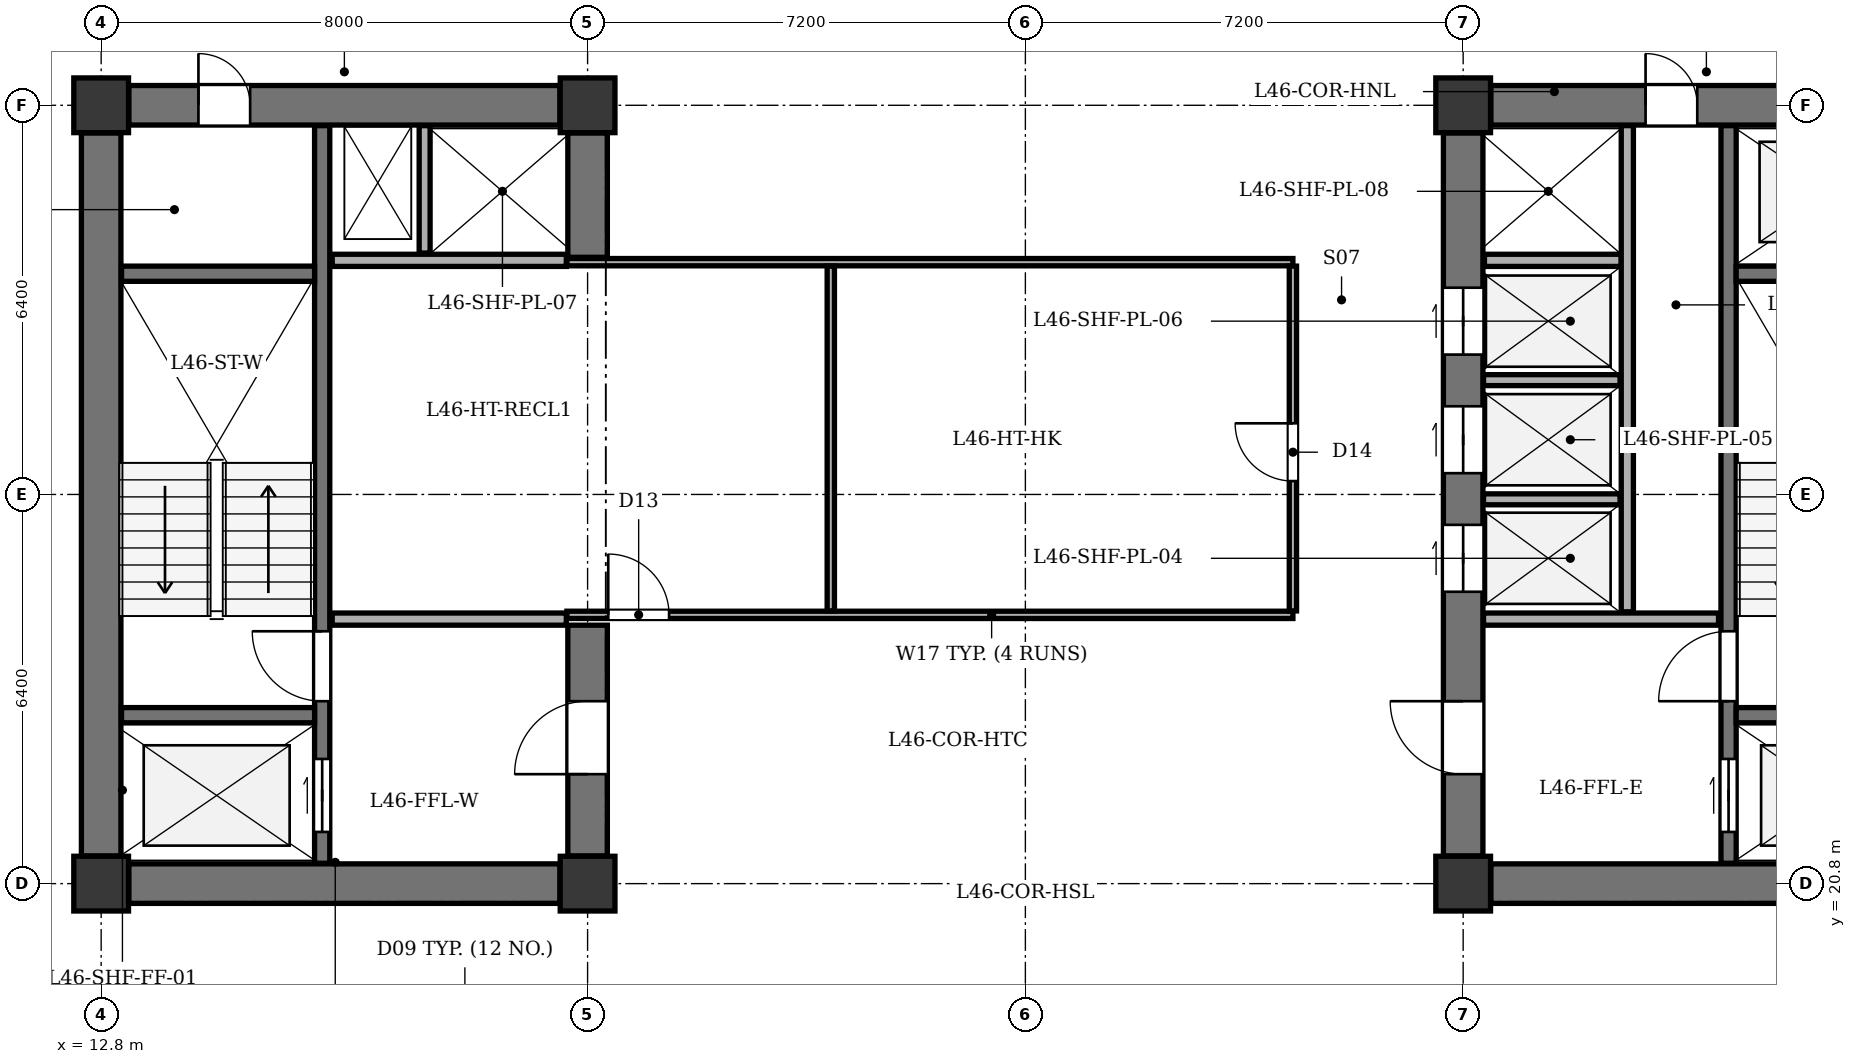
"""IFC4 building model, lengths in metres.
Left out: names, types, materials, properties, quantities, classifications, styles, units other than length and angle.
Written with IfcOpenShell. Run it as: python <this file> out.ifc"""

import sys

from ifc_helpers import new_model, si_unit, direction, frame, frame_2d, origin, origin_2d, place, context, subcontext, project, spatial, rectangle, extrude, element, fill, save


model = new_model("IFC4")
c1 = context("Model", 3, precision=1e-05, world=origin(), true_north=direction((0.0, 1.0)))
c2 = subcontext(c1, "Body", "Model", "MODEL_VIEW")
j1 = project(units=[si_unit("LENGTHUNIT", "METRE"), si_unit("PLANEANGLEUNIT", "RADIAN")], contexts=[c1])
p1 = place(None, origin())
s1 = spatial("IfcSite", under=j1, at=p1, CompositionType="ELEMENT")
p2 = place(p1, origin())
s2 = spatial("IfcBuilding", under=s1, at=p2, CompositionType="ELEMENT")
p3 = place(p2, frame((0.0, 0.0, 179.8)))
s3 = spatial("IfcBuildingStorey", under=s2, at=p3, CompositionType="ELEMENT", Elevation=179.8)
for number, where, z_axis, x_axis in (
    (1, (12.8, 20.8, 0.0), (0.0, 0.0, 1.0), (1.0, 0.0, 0.0)),
    (2, (20.8, 20.8, 0.0), (0.0, 0.0, 1.0), (1.0, 0.0, 0.0)),
    (3, (12.8, 33.6, 0.0), (0.0, 0.0, 1.0), (1.0, 0.0, 0.0)),
    (4, (20.8, 33.6, 0.0), (0.0, 0.0, 1.0), (1.0, 0.0, 0.0)),
    (5, (35.2, 20.8, 0.0), (0.0, 0.0, 1.0), (1.0, 0.0, 0.0)),
    (6, (35.2, 33.6, 0.0), (0.0, 0.0, 1.0), (1.0, 0.0, 0.0)),
):
    element("IfcColumn", number, at=place(p3, frame(where, z_axis=z_axis, x_axis=x_axis)), inside=s3, PredefinedType="COLUMN", context=c2, shape_type="SweptSolid", body=[
        extrude(rectangle(XDim=0.9, YDim=0.9, at=origin_2d()), origin(), (0.0, 0.0, 1.0), 3.5),
    ])
p4 = place(p3, frame((12.8, 21.255, 0.0), z_axis=(0.0, 0.0, 1.0), x_axis=(0.0, 1.0, 0.0)))
e7 = element("IfcWall", 7, at=p4, inside=s3, PredefinedType="SHEAR", context=c2, shape_type="SweptSolid", body=[
    extrude(rectangle(XDim=11.89, YDim=0.65, at=frame_2d((5.945, 0.0))), origin(), (0.0, 0.0, 1.0), 3.05),
])
p5 = place(p3, frame((13.255, 20.8, 0.0), z_axis=(0.0, 0.0, 1.0), x_axis=(1.0, 0.0, 0.0)))
e8 = element("IfcWall", 8, at=p5, inside=s3, PredefinedType="SHEAR", context=c2, shape_type="SweptSolid", body=[
    extrude(rectangle(XDim=7.09, YDim=0.65, at=frame_2d((3.545, 0.0))), origin(), (0.0, 0.0, 1.0), 3.05),
])
p6 = place(p3, frame((13.255, 33.6, 0.0), z_axis=(0.0, 0.0, 1.0), x_axis=(1.0, 0.0, 0.0)))
e9 = element("IfcWall", 9, at=p6, inside=s3, PredefinedType="SHEAR", context=c2, shape_type="SweptSolid", body=[
    extrude(rectangle(XDim=7.09, YDim=0.65, at=frame_2d((3.545, 0.0))), origin(), (0.0, 0.0, 1.0), 3.05),
])
p7 = place(p6, frame((1.145, 0.0, 0.0)))
e10 = element("IfcOpeningElement", 10, at=p7, cuts=e9, PredefinedType="OPENING", context=c2, shape_type="SweptSolid", body=[
    extrude(rectangle(XDim=0.85, YDim=2.02, at=frame_2d((0.425, 1.01))), frame((0.0, 0.335, 0.0), z_axis=(0.0, -1.0, 0.0), x_axis=(1.0, 0.0, 0.0)), (0.0, 0.0, 1.0), 0.67),
])
p8 = place(p3, frame((20.8, 21.255, 0.0), z_axis=(0.0, 0.0, 1.0), x_axis=(0.0, 1.0, 0.0)))
e11 = element("IfcWall", 11, at=p8, inside=s3, PredefinedType="SHEAR", context=c2, shape_type="SweptSolid", body=[
    extrude(rectangle(XDim=3.795, YDim=0.65, at=frame_2d((1.897, 0.0))), origin(), (0.0, 0.0, 1.0), 3.05),
])
p9 = place(p8, frame((1.345, 0.0, 0.0)))
e12 = element("IfcOpeningElement", 12, at=p9, cuts=e11, PredefinedType="OPENING", context=c2, shape_type="SweptSolid", body=[
    extrude(rectangle(XDim=1.2, YDim=2.15, at=frame_2d((0.6, 1.075))), frame((0.0, 0.335, 0.0), z_axis=(0.0, -1.0, 0.0), x_axis=(1.0, 0.0, 0.0)), (0.0, 0.0, 1.0), 0.67),
])
p10 = place(p3, frame((20.8, 31.1, 0.0), z_axis=(0.0, 0.0, 1.0), x_axis=(0.0, 1.0, 0.0)))
e13 = element("IfcWall", 13, at=p10, inside=s3, PredefinedType="SHEAR", context=c2, shape_type="SweptSolid", body=[
    extrude(rectangle(XDim=2.045, YDim=0.65, at=frame_2d((1.022, 0.0))), origin(), (0.0, 0.0, 1.0), 3.05),
])
p11 = place(p3, frame((16.435, 21.135, 0.0), z_axis=(0.0, 0.0, 1.0), x_axis=(0.0, 1.0, 0.0)))
e14 = element("IfcWall", 14, at=p11, inside=s3, PredefinedType="SHEAR", context=c2, shape_type="SweptSolid", body=[
    extrude(rectangle(XDim=12.13, YDim=0.25, at=frame_2d((6.065, 0.0))), origin(), (0.0, 0.0, 1.0), 3.05),
])
p12 = place(p11, frame((0.515, 0.0, 0.0)))
e15 = element("IfcOpeningElement", 15, at=p12, cuts=e14, PredefinedType="OPENING", context=c2, shape_type="SweptSolid", body=[
    extrude(rectangle(XDim=1.2, YDim=2.15, at=frame_2d((0.6, 1.075))), frame((0.0, 0.135, 0.0), z_axis=(0.0, -1.0, 0.0), x_axis=(1.0, 0.0, 0.0)), (0.0, 0.0, 1.0), 0.27),
])
p13 = place(p11, frame((2.665, 0.0, 0.0)))
e16 = element("IfcOpeningElement", 16, at=p13, cuts=e14, PredefinedType="OPENING", context=c2, shape_type="SweptSolid", body=[
    extrude(rectangle(XDim=1.15, YDim=2.15, at=frame_2d((0.575, 1.075))), frame((0.0, 0.135, 0.0), z_axis=(0.0, -1.0, 0.0), x_axis=(1.0, 0.0, 0.0)), (0.0, 0.0, 1.0), 0.27),
])
for number, where, z_axis, x_axis in (
    (17, (13.135, 23.57, 0.0), (0.0, 0.0, 1.0), (1.0, 0.0, 0.0)),
    (18, (13.135, 30.83, 0.0), (0.0, 0.0, 1.0), (1.0, 0.0, 0.0)),
):
    element("IfcWall", number, at=place(p3, frame(where, z_axis=z_axis, x_axis=x_axis)), inside=s3, PredefinedType="SHEAR", context=c2, shape_type="SweptSolid", body=[
        extrude(rectangle(XDim=3.175, YDim=0.25, at=frame_2d((1.587, 0.0))), origin(), (0.0, 0.0, 1.0), 3.05),
    ])
for number, where, z_axis, x_axis in (
    (19, (16.6, 25.15, 0.0), (0.0, 0.0, 1.0), (1.0, 0.0, 0.0)),
    (20, (16.6, 31.05, 0.0), (0.0, 0.0, 1.0), (1.0, 0.0, 0.0)),
):
    element("IfcWall", number, at=place(p3, frame(where, z_axis=z_axis, x_axis=x_axis)), inside=s3, PredefinedType="SOLIDWALL", context=c2, shape_type="SweptSolid", body=[
        extrude(rectangle(XDim=3.85, YDim=0.2, at=frame_2d((1.925, 0.0))), origin(), (0.0, 0.0, 1.0), 3.05),
    ])
p14 = place(p3, frame((18.12, 31.17, 0.0), z_axis=(0.0, 0.0, 1.0), x_axis=(0.0, 1.0, 0.0)))
e21 = element("IfcWall", 21, at=p14, inside=s3, PredefinedType="PARTITIONING", context=c2, shape_type="SweptSolid", body=[
    extrude(rectangle(XDim=2.095, YDim=0.18, at=frame_2d((1.047, 0.0))), origin(), (0.0, 0.0, 1.0), 3.05),
])
p15 = place(p3, frame((35.655, 20.8, 0.0), z_axis=(0.0, 0.0, 1.0), x_axis=(1.0, 0.0, 0.0)))
e22 = element("IfcWall", 22, at=p15, inside=s3, PredefinedType="SHEAR", context=c2, shape_type="SweptSolid", body=[
    extrude(rectangle(XDim=7.09, YDim=0.65, at=frame_2d((3.545, 0.0))), origin(), (0.0, 0.0, 1.0), 3.05),
])
p16 = place(p3, frame((35.655, 33.6, 0.0), z_axis=(0.0, 0.0, 1.0), x_axis=(1.0, 0.0, 0.0)))
e23 = element("IfcWall", 23, at=p16, inside=s3, PredefinedType="SHEAR", context=c2, shape_type="SweptSolid", body=[
    extrude(rectangle(XDim=7.09, YDim=0.65, at=frame_2d((3.545, 0.0))), origin(), (0.0, 0.0, 1.0), 3.05),
])
p17 = place(p16, frame((4.745, 0.0, 0.0)))
e24 = element("IfcOpeningElement", 24, at=p17, cuts=e23, PredefinedType="OPENING", context=c2, shape_type="SweptSolid", body=[
    extrude(rectangle(XDim=1.3, YDim=2.15, at=frame_2d((0.65, 1.075))), frame((0.0, 0.335, 0.0), z_axis=(0.0, -1.0, 0.0), x_axis=(1.0, 0.0, 0.0)), (0.0, 0.0, 1.0), 0.67),
])
p18 = place(p16, frame((2.545, 0.0, 0.0)))
e25 = element("IfcOpeningElement", 25, at=p18, cuts=e23, PredefinedType="OPENING", context=c2, shape_type="SweptSolid", body=[
    extrude(rectangle(XDim=0.85, YDim=2.02, at=frame_2d((0.425, 1.01))), frame((0.0, 0.335, 0.0), z_axis=(0.0, -1.0, 0.0), x_axis=(1.0, 0.0, 0.0)), (0.0, 0.0, 1.0), 0.67),
])
p19 = place(p3, frame((35.2, 21.255, 0.0), z_axis=(0.0, 0.0, 1.0), x_axis=(0.0, 1.0, 0.0)))
e26 = element("IfcWall", 26, at=p19, inside=s3, PredefinedType="SHEAR", context=c2, shape_type="SweptSolid", body=[
    extrude(rectangle(XDim=11.89, YDim=0.65, at=frame_2d((5.945, 0.0))), origin(), (0.0, 0.0, 1.0), 3.05),
])
p20 = place(p19, frame((1.345, 0.0, 0.0)))
e27 = element("IfcOpeningElement", 27, at=p20, cuts=e26, PredefinedType="OPENING", context=c2, shape_type="SweptSolid", body=[
    extrude(rectangle(XDim=1.2, YDim=2.15, at=frame_2d((0.6, 1.075))), frame((0.0, 0.335, 0.0), z_axis=(0.0, -1.0, 0.0), x_axis=(1.0, 0.0, 0.0)), (0.0, 0.0, 1.0), 0.67),
])
p21 = place(p19, frame((4.345, 0.0, 0.0)))
e28 = element("IfcOpeningElement", 28, at=p21, cuts=e26, PredefinedType="OPENING", context=c2, shape_type="SweptSolid", body=[
    extrude(rectangle(XDim=1.1, YDim=2.1, at=frame_2d((0.55, 1.05))), frame((0.0, 0.335, 0.0), z_axis=(0.0, -1.0, 0.0), x_axis=(1.0, 0.0, 0.0)), (0.0, 0.0, 1.0), 0.67),
])
p22 = place(p19, frame((6.295, 0.0, 0.0)))
e29 = element("IfcOpeningElement", 29, at=p22, cuts=e26, PredefinedType="OPENING", context=c2, shape_type="SweptSolid", body=[
    extrude(rectangle(XDim=1.1, YDim=2.1, at=frame_2d((0.55, 1.05))), frame((0.0, 0.335, 0.0), z_axis=(0.0, -1.0, 0.0), x_axis=(1.0, 0.0, 0.0)), (0.0, 0.0, 1.0), 0.67),
])
p23 = place(p19, frame((8.245, 0.0, 0.0)))
e30 = element("IfcOpeningElement", 30, at=p23, cuts=e26, PredefinedType="OPENING", context=c2, shape_type="SweptSolid", body=[
    extrude(rectangle(XDim=1.1, YDim=2.1, at=frame_2d((0.55, 1.05))), frame((0.0, 0.335, 0.0), z_axis=(0.0, -1.0, 0.0), x_axis=(1.0, 0.0, 0.0)), (0.0, 0.0, 1.0), 0.67),
])
p24 = place(p3, frame((39.565, 21.135, 0.0), z_axis=(0.0, 0.0, 1.0), x_axis=(0.0, 1.0, 0.0)))
e31 = element("IfcWall", 31, at=p24, inside=s3, PredefinedType="SHEAR", context=c2, shape_type="SweptSolid", body=[
    extrude(rectangle(XDim=12.13, YDim=0.25, at=frame_2d((6.065, 0.0))), origin(), (0.0, 0.0, 1.0), 3.05),
])
p25 = place(p24, frame((0.515, 0.0, 0.0)))
e32 = element("IfcOpeningElement", 32, at=p25, cuts=e31, PredefinedType="OPENING", context=c2, shape_type="SweptSolid", body=[
    extrude(rectangle(XDim=1.2, YDim=2.15, at=frame_2d((0.6, 1.075))), frame((0.0, 0.135, 0.0), z_axis=(0.0, -1.0, 0.0), x_axis=(1.0, 0.0, 0.0)), (0.0, 0.0, 1.0), 0.27),
])
p26 = place(p24, frame((2.665, 0.0, 0.0)))
e33 = element("IfcOpeningElement", 33, at=p26, cuts=e31, PredefinedType="OPENING", context=c2, shape_type="SweptSolid", body=[
    extrude(rectangle(XDim=1.15, YDim=2.15, at=frame_2d((0.575, 1.075))), frame((0.0, 0.135, 0.0), z_axis=(0.0, -1.0, 0.0), x_axis=(1.0, 0.0, 0.0)), (0.0, 0.0, 1.0), 0.27),
])
for number, where, z_axis, x_axis in (
    (34, (39.69, 23.57, 0.0), (0.0, 0.0, 1.0), (1.0, 0.0, 0.0)),
    (35, (39.69, 30.83, 0.0), (0.0, 0.0, 1.0), (1.0, 0.0, 0.0)),
):
    element("IfcWall", number, at=place(p3, frame(where, z_axis=z_axis, x_axis=x_axis)), inside=s3, PredefinedType="SHEAR", context=c2, shape_type="SweptSolid", body=[
        extrude(rectangle(XDim=3.175, YDim=0.25, at=frame_2d((1.587, 0.0))), origin(), (0.0, 0.0, 1.0), 3.05),
    ])
p27 = place(p3, frame((35.535, 25.15, 0.0), z_axis=(0.0, 0.0, 1.0), x_axis=(1.0, 0.0, 0.0)))
e36 = element("IfcWall", 36, at=p27, inside=s3, PredefinedType="SOLIDWALL", context=c2, shape_type="SweptSolid", body=[
    extrude(rectangle(XDim=3.865, YDim=0.2, at=frame_2d((1.933, 0.0))), origin(), (0.0, 0.0, 1.0), 3.05),
])
p28 = place(p3, frame((35.55, 31.05, 0.0), z_axis=(0.0, 0.0, 1.0), x_axis=(1.0, 0.0, 0.0)))
e37 = element("IfcWall", 37, at=p28, inside=s3, PredefinedType="SOLIDWALL", context=c2, shape_type="SweptSolid", body=[
    extrude(rectangle(XDim=2.25, YDim=0.2, at=frame_2d((1.125, 0.0))), origin(), (0.0, 0.0, 1.0), 3.05),
])
p29 = place(p3, frame((37.9, 25.27, 0.0), z_axis=(0.0, 0.0, 1.0), x_axis=(0.0, 1.0, 0.0)))
e38 = element("IfcWall", 38, at=p29, inside=s3, PredefinedType="SOLIDWALL", context=c2, shape_type="SweptSolid", body=[
    extrude(rectangle(XDim=7.995, YDim=0.2, at=frame_2d((3.998, 0.0))), origin(), (0.0, 0.0, 1.0), 3.05),
])
for number, where, z_axis, x_axis in (
    (39, (35.535, 27.12, 0.0), (0.0, 0.0, 1.0), (1.0, 0.0, 0.0)),
    (40, (35.535, 29.08, 0.0), (0.0, 0.0, 1.0), (1.0, 0.0, 0.0)),
):
    element("IfcWall", number, at=place(p3, frame(where, z_axis=z_axis, x_axis=x_axis)), inside=s3, PredefinedType="PARTITIONING", context=c2, shape_type="SweptSolid", body=[
        extrude(rectangle(XDim=2.245, YDim=0.18, at=frame_2d((1.123, 0.0))), origin(), (0.0, 0.0, 1.0), 3.05),
    ])
p30 = place(p3, frame((20.46, 25.22, 0.0), z_axis=(0.0, 0.0, 1.0), x_axis=(1.0, 0.0, 0.0)))
e41 = element("IfcWall", 41, at=p30, inside=s3, PredefinedType="PARTITIONING", context=c2, shape_type="SweptSolid", body=[
    extrude(rectangle(XDim=11.94, YDim=0.12, at=frame_2d((5.97, 0.0))), origin(), (0.0, 0.0, 1.0), 3.05),
])
p31 = place(p30, frame((0.68, 0.0, 0.0)))
e42 = element("IfcOpeningElement", 42, at=p31, cuts=e41, PredefinedType="OPENING", context=c2, shape_type="SweptSolid", body=[
    extrude(rectangle(XDim=1.0, YDim=2.1, at=frame_2d((0.5, 1.05))), frame((0.0, 0.07, 0.0), z_axis=(0.0, -1.0, 0.0), x_axis=(1.0, 0.0, 0.0)), (0.0, 0.0, 1.0), 0.14),
])
p32 = place(p3, frame((20.46, 31.02, 0.0), z_axis=(0.0, 0.0, 1.0), x_axis=(1.0, 0.0, 0.0)))
e43 = element("IfcWall", 43, at=p32, inside=s3, PredefinedType="PARTITIONING", context=c2, shape_type="SweptSolid", body=[
    extrude(rectangle(XDim=11.94, YDim=0.12, at=frame_2d((5.97, 0.0))), origin(), (0.0, 0.0, 1.0), 3.05),
])
p33 = place(p3, frame((32.4, 25.285, 0.0), z_axis=(0.0, 0.0, 1.0), x_axis=(0.0, 1.0, 0.0)))
e44 = element("IfcWall", 44, at=p33, inside=s3, PredefinedType="PARTITIONING", context=c2, shape_type="SweptSolid", body=[
    extrude(rectangle(XDim=5.67, YDim=0.12, at=frame_2d((2.835, 0.0))), origin(), (0.0, 0.0, 1.0), 3.05),
])
p34 = place(p33, frame((2.135, 0.0, 0.0)))
e45 = element("IfcOpeningElement", 45, at=p34, cuts=e44, PredefinedType="OPENING", context=c2, shape_type="SweptSolid", body=[
    extrude(rectangle(XDim=0.95, YDim=2.1, at=frame_2d((0.475, 1.05))), frame((0.0, 0.07, 0.0), z_axis=(0.0, -1.0, 0.0), x_axis=(1.0, 0.0, 0.0)), (0.0, 0.0, 1.0), 0.14),
])
p35 = place(p3, frame((24.8, 25.285, 0.0), z_axis=(0.0, 0.0, 1.0), x_axis=(0.0, 1.0, 0.0)))
e46 = element("IfcWall", 46, at=p35, inside=s3, PredefinedType="PARTITIONING", context=c2, shape_type="SweptSolid", body=[
    extrude(rectangle(XDim=5.67, YDim=0.12, at=frame_2d((2.835, 0.0))), origin(), (0.0, 0.0, 1.0), 3.05),
])
p36 = place(p7, origin())
e47 = element("IfcDoor", 47, at=p36, inside=s3, OperationType="SINGLE_SWING_LEFT", PredefinedType="DOOR", context=c2, shape_type="SweptSolid", body=[
    extrude(rectangle(XDim=0.85, YDim=2.02, at=frame_2d((0.425, 1.01))), frame((0.0, 0.025, 0.0), z_axis=(0.0, -1.0, 0.0), x_axis=(1.0, 0.0, 0.0)), (0.0, 0.0, 1.0), 0.05),
])
fill(e10, e47)
p37 = place(p9, origin())
e48 = element("IfcDoor", 48, at=p37, inside=s3, OperationType="SINGLE_SWING_LEFT", PredefinedType="DOOR", context=c2, shape_type="SweptSolid", body=[
    extrude(rectangle(XDim=1.2, YDim=2.15, at=frame_2d((0.6, 1.075))), frame((0.0, 0.025, 0.0), z_axis=(0.0, -1.0, 0.0), x_axis=(1.0, 0.0, 0.0)), (0.0, 0.0, 1.0), 0.05),
])
fill(e12, e48)
p38 = place(p12, origin())
e49 = element("IfcDoor", 49, at=p38, inside=s3, OperationType="DOUBLE_DOOR_SLIDING", PredefinedType="DOOR", context=c2, shape_type="SweptSolid", body=[
    extrude(rectangle(XDim=1.2, YDim=2.15, at=frame_2d((0.6, 1.075))), frame((0.0, 0.025, 0.0), z_axis=(0.0, -1.0, 0.0), x_axis=(1.0, 0.0, 0.0)), (0.0, 0.0, 1.0), 0.05),
])
fill(e15, e49)
p39 = place(p13, origin())
e50 = element("IfcDoor", 50, at=p39, inside=s3, OperationType="SINGLE_SWING_RIGHT", PredefinedType="DOOR", context=c2, shape_type="SweptSolid", body=[
    extrude(rectangle(XDim=1.15, YDim=2.15, at=frame_2d((0.575, 1.075))), frame((0.0, 0.025, 0.0), z_axis=(0.0, -1.0, 0.0), x_axis=(1.0, 0.0, 0.0)), (0.0, 0.0, 1.0), 0.05),
])
fill(e16, e50)
p40 = place(p18, origin())
e51 = element("IfcDoor", 51, at=p40, inside=s3, OperationType="SINGLE_SWING_LEFT", PredefinedType="DOOR", context=c2, shape_type="SweptSolid", body=[
    extrude(rectangle(XDim=0.85, YDim=2.02, at=frame_2d((0.425, 1.01))), frame((0.0, 0.025, 0.0), z_axis=(0.0, -1.0, 0.0), x_axis=(1.0, 0.0, 0.0)), (0.0, 0.0, 1.0), 0.05),
])
fill(e25, e51)
p41 = place(p20, origin())
e52 = element("IfcDoor", 52, at=p41, inside=s3, OperationType="SINGLE_SWING_RIGHT", PredefinedType="DOOR", context=c2, shape_type="SweptSolid", body=[
    extrude(rectangle(XDim=1.2, YDim=2.15, at=frame_2d((0.6, 1.075))), frame((0.0, 0.025, 0.0), z_axis=(0.0, -1.0, 0.0), x_axis=(1.0, 0.0, 0.0)), (0.0, 0.0, 1.0), 0.05),
])
fill(e27, e52)
p42 = place(p21, origin())
e53 = element("IfcDoor", 53, at=p42, inside=s3, OperationType="DOUBLE_DOOR_SLIDING", PredefinedType="DOOR", context=c2, shape_type="SweptSolid", body=[
    extrude(rectangle(XDim=1.1, YDim=2.1, at=frame_2d((0.55, 1.05))), frame((0.0, 0.025, 0.0), z_axis=(0.0, -1.0, 0.0), x_axis=(1.0, 0.0, 0.0)), (0.0, 0.0, 1.0), 0.05),
])
fill(e28, e53)
p43 = place(p22, origin())
e54 = element("IfcDoor", 54, at=p43, inside=s3, OperationType="DOUBLE_DOOR_SLIDING", PredefinedType="DOOR", context=c2, shape_type="SweptSolid", body=[
    extrude(rectangle(XDim=1.1, YDim=2.1, at=frame_2d((0.55, 1.05))), frame((0.0, 0.025, 0.0), z_axis=(0.0, -1.0, 0.0), x_axis=(1.0, 0.0, 0.0)), (0.0, 0.0, 1.0), 0.05),
])
fill(e29, e54)
p44 = place(p23, origin())
e55 = element("IfcDoor", 55, at=p44, inside=s3, OperationType="DOUBLE_DOOR_SLIDING", PredefinedType="DOOR", context=c2, shape_type="SweptSolid", body=[
    extrude(rectangle(XDim=1.1, YDim=2.1, at=frame_2d((0.55, 1.05))), frame((0.0, 0.025, 0.0), z_axis=(0.0, -1.0, 0.0), x_axis=(1.0, 0.0, 0.0)), (0.0, 0.0, 1.0), 0.05),
])
fill(e30, e55)
p45 = place(p25, origin())
e56 = element("IfcDoor", 56, at=p45, inside=s3, OperationType="DOUBLE_DOOR_SLIDING", PredefinedType="DOOR", context=c2, shape_type="SweptSolid", body=[
    extrude(rectangle(XDim=1.2, YDim=2.15, at=frame_2d((0.6, 1.075))), frame((0.0, 0.025, 0.0), z_axis=(0.0, -1.0, 0.0), x_axis=(1.0, 0.0, 0.0)), (0.0, 0.0, 1.0), 0.05),
])
fill(e32, e56)
p46 = place(p26, origin())
e57 = element("IfcDoor", 57, at=p46, inside=s3, OperationType="SINGLE_SWING_LEFT", PredefinedType="DOOR", context=c2, shape_type="SweptSolid", body=[
    extrude(rectangle(XDim=1.15, YDim=2.15, at=frame_2d((0.575, 1.075))), frame((0.0, 0.025, 0.0), z_axis=(0.0, -1.0, 0.0), x_axis=(1.0, 0.0, 0.0)), (0.0, 0.0, 1.0), 0.05),
])
fill(e33, e57)
p47 = place(p31, origin())
e58 = element("IfcDoor", 58, at=p47, inside=s3, OperationType="SINGLE_SWING_LEFT", PredefinedType="DOOR", context=c2, shape_type="SweptSolid", body=[
    extrude(rectangle(XDim=1.0, YDim=2.1, at=frame_2d((0.5, 1.05))), frame((0.0, 0.025, 0.0), z_axis=(0.0, -1.0, 0.0), x_axis=(1.0, 0.0, 0.0)), (0.0, 0.0, 1.0), 0.05),
])
fill(e42, e58)
p48 = place(p34, origin())
e59 = element("IfcDoor", 59, at=p48, inside=s3, OperationType="SINGLE_SWING_RIGHT", PredefinedType="DOOR", context=c2, shape_type="SweptSolid", body=[
    extrude(rectangle(XDim=0.95, YDim=2.1, at=frame_2d((0.475, 1.05))), frame((0.0, 0.025, 0.0), z_axis=(0.0, -1.0, 0.0), x_axis=(1.0, 0.0, 0.0)), (0.0, 0.0, 1.0), 0.05),
])
fill(e45, e59)
save(model, sys.argv[1])
